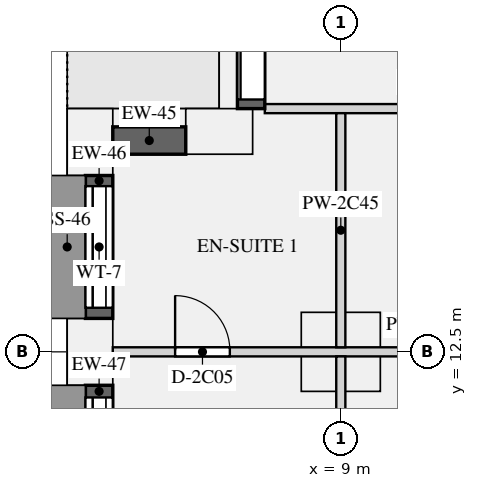
"""IFC4 building model, lengths in metres.
Left out: names, types, materials, properties, quantities, classifications, styles, units other than length and angle.
Written with IfcOpenShell. Run it as: python <this file> out.ifc"""

import sys

from ifc_helpers import new_model, si_unit, direction, frame, frame_2d, origin, origin_2d, place, context, subcontext, project, spatial, rectangle, extrude, element, fill, save


model = new_model("IFC4")
c1 = context("Model", 3, precision=1e-05, world=origin(), true_north=direction((0.0, 1.0)))
c2 = subcontext(c1, "Body", "Model", "MODEL_VIEW")
j1 = project(units=[si_unit("LENGTHUNIT", "METRE"), si_unit("PLANEANGLEUNIT", "RADIAN")], contexts=[c1])
p1 = place(None, origin())
s1 = spatial("IfcSite", under=j1, at=p1, CompositionType="ELEMENT")
p2 = place(p1, origin())
s2 = spatial("IfcBuilding", under=s1, at=p2, CompositionType="ELEMENT")
p3 = place(p2, frame((0.0, 0.0, 102.45)))
s3 = spatial("IfcBuildingStorey", under=s2, at=p3, CompositionType="ELEMENT", Elevation=102.45)
for number, where, z_axis, x_axis in (
    (1, (7.0, 16.125, 0.0), (0.0, 0.0, 1.0), (-1.0, 0.0, 0.0)),
    (2, (4.875, 15.95, 0.0), (0.0, 0.0, 1.0), (0.0, -1.0, 0.0)),
    (3, (4.875, 12.5, 0.0), (0.0, 0.0, 1.0), (0.0, -1.0, 0.0)),
):
    element("IfcColumn", number, at=place(p3, frame(where, z_axis=z_axis, x_axis=x_axis)), inside=s3, PredefinedType="USERDEFINED", context=c2, shape_type="SweptSolid", body=[
        extrude(rectangle(XDim=1.1, YDim=0.75, at=origin_2d()), origin(), (0.0, 0.0, 1.0), 3.15),
    ])
p4 = place(p3, frame((9.0, 12.5, 0.0), z_axis=(0.0, 0.0, 1.0), x_axis=(1.0, 0.0, 0.0)))
e4 = element("IfcColumn", 4, at=p4, inside=s3, PredefinedType="COLUMN", context=c2, shape_type="SweptSolid", body=[
    extrude(rectangle(XDim=1.3, YDim=1.3, at=origin_2d()), origin(), (0.0, 0.0, 1.0), 3.15),
])
p5 = place(p3, frame((7.525, 19.95, 0.0), z_axis=(0.0, 0.0, 1.0), x_axis=(0.0, -1.0, 0.0)))
e5 = element("IfcWall", 5, at=p5, inside=s3, PredefinedType="SOLIDWALL", context=c2, shape_type="SweptSolid", body=[
    extrude(rectangle(XDim=3.45, YDim=0.45, at=frame_2d((1.725, 0.0))), origin(), (0.0, 0.0, 1.0), 2.83),
])
p6 = place(p5, frame((0.15, 0.0, 0.0)))
e6 = element("IfcOpeningElement", 6, at=p6, cuts=e5, PredefinedType="OPENING", context=c2, shape_type="SweptSolid", body=[
    extrude(rectangle(XDim=3.15, YDim=2.3, at=frame_2d((1.575, 1.15))), frame((0.0, 0.235, 0.0), z_axis=(0.0, -1.0, 0.0), x_axis=(1.0, 0.0, 0.0)), (0.0, 0.0, 1.0), 0.47),
])
p7 = place(p3, frame((6.45, 15.975, 0.9), z_axis=(0.0, 0.0, 1.0), x_axis=(-1.0, 0.0, 0.0)))
e7 = element("IfcWall", 7, at=p7, inside=s3, PredefinedType="SOLIDWALL", context=c2, shape_type="SweptSolid", body=[
    extrude(rectangle(XDim=1.2, YDim=0.45, at=frame_2d((0.6, 0.0))), origin(), (0.0, 0.0, 1.0), 1.93),
])
p8 = place(p3, frame((5.025, 15.4, 0.9), z_axis=(0.0, 0.0, 1.0), x_axis=(0.0, -1.0, 0.0)))
e8 = element("IfcWall", 8, at=p8, inside=s3, PredefinedType="SOLIDWALL", context=c2, shape_type="SweptSolid", body=[
    extrude(rectangle(XDim=2.35, YDim=0.45, at=frame_2d((1.175, 0.0))), origin(), (0.0, 0.0, 1.0), 1.93),
])
p9 = place(p8, frame((0.175, 0.0, 0.15)))
e9 = element("IfcOpeningElement", 9, at=p9, cuts=e8, PredefinedType="OPENING", context=c2, shape_type="SweptSolid", body=[
    extrude(rectangle(XDim=2.0, YDim=1.5, at=frame_2d((1.0, 0.75))), frame((0.0, 0.235, 0.0), z_axis=(0.0, -1.0, 0.0), x_axis=(1.0, 0.0, 0.0)), (0.0, 0.0, 1.0), 0.47),
])
p10 = place(p3, frame((5.025, 11.95, 0.9), z_axis=(0.0, 0.0, 1.0), x_axis=(0.0, -1.0, 0.0)))
e10 = element("IfcWall", 10, at=p10, inside=s3, PredefinedType="SOLIDWALL", context=c2, shape_type="SweptSolid", body=[
    extrude(rectangle(XDim=2.9, YDim=0.45, at=frame_2d((1.45, 0.0))), origin(), (0.0, 0.0, 1.0), 1.93),
])
p11 = place(p10, frame((0.2, 0.0, 0.15)))
e11 = element("IfcOpeningElement", 11, at=p11, cuts=e10, PredefinedType="OPENING", context=c2, shape_type="SweptSolid", body=[
    extrude(rectangle(XDim=2.5, YDim=1.5, at=frame_2d((1.25, 0.75))), frame((0.0, 0.235, 0.0), z_axis=(0.0, -1.0, 0.0), x_axis=(1.0, 0.0, 0.0)), (0.0, 0.0, 1.0), 0.47),
])
p12 = place(p3, frame((5.25, 12.5, 0.0), z_axis=(0.0, 0.0, 1.0), x_axis=(1.0, 0.0, 0.0)))
e12 = element("IfcWall", 12, at=p12, inside=s3, PredefinedType="PARTITIONING", context=c2, shape_type="SweptSolid", body=[
    extrude(rectangle(XDim=8.325, YDim=0.15, at=frame_2d((4.163, 0.0))), origin(), (0.0, 0.0, 1.0), 2.83),
])
p13 = place(p12, frame((1.025, 0.0, 0.0)))
e13 = element("IfcOpeningElement", 13, at=p13, cuts=e12, PredefinedType="OPENING", context=c2, shape_type="SweptSolid", body=[
    extrude(rectangle(XDim=0.9, YDim=2.1, at=frame_2d((0.45, 1.05))), frame((0.0, 0.085, 0.0), z_axis=(0.0, -1.0, 0.0), x_axis=(1.0, 0.0, 0.0)), (0.0, 0.0, 1.0), 0.17),
])
p14 = place(p3, frame((7.75, 16.5, 0.0), z_axis=(0.0, 0.0, 1.0), x_axis=(1.0, 0.0, 0.0)))
e14 = element("IfcWall", 14, at=p14, inside=s3, PredefinedType="PARTITIONING", context=c2, shape_type="SweptSolid", body=[
    extrude(rectangle(XDim=5.675, YDim=0.15, at=frame_2d((2.837, 0.0))), origin(), (0.0, 0.0, 1.0), 2.83),
])
p15 = place(p3, frame((9.0, 5.25, 0.0), z_axis=(0.0, 0.0, 1.0), x_axis=(0.0, 1.0, 0.0)))
e15 = element("IfcWall", 15, at=p15, inside=s3, PredefinedType="PARTITIONING", context=c2, shape_type="SweptSolid", body=[
    extrude(rectangle(XDim=7.175, YDim=0.15, at=frame_2d((3.587, 0.0))), origin(), (0.0, 0.0, 1.0), 2.83),
])
p16 = place(p15, frame((4.475, 0.0, 0.0)))
e16 = element("IfcOpeningElement", 16, at=p16, cuts=e15, PredefinedType="OPENING", context=c2, shape_type="SweptSolid", body=[
    extrude(rectangle(XDim=0.9, YDim=2.1, at=frame_2d((0.45, 1.05))), frame((0.0, 0.085, 0.0), z_axis=(0.0, -1.0, 0.0), x_axis=(1.0, 0.0, 0.0)), (0.0, 0.0, 1.0), 0.17),
])
p17 = place(p3, frame((9.0, 12.575, 0.0), z_axis=(0.0, 0.0, 1.0), x_axis=(0.0, 1.0, 0.0)))
e17 = element("IfcWall", 17, at=p17, inside=s3, PredefinedType="PARTITIONING", context=c2, shape_type="SweptSolid", body=[
    extrude(rectangle(XDim=3.85, YDim=0.15, at=frame_2d((1.925, 0.0))), origin(), (0.0, 0.0, 1.0), 2.83),
])
p18 = place(p6, origin())
e18 = element("IfcDoor", 18, at=p18, inside=s3, OperationType="SLIDING_TO_LEFT", PredefinedType="DOOR", context=c2, shape_type="SweptSolid", body=[
    extrude(rectangle(XDim=3.15, YDim=2.3, at=frame_2d((1.575, 1.15))), frame((0.0, -0.07, 0.0), z_axis=(0.0, -1.0, 0.0), x_axis=(1.0, 0.0, 0.0)), (0.0, 0.0, 1.0), 0.05),
])
fill(e6, e18)
p19 = place(p9, origin())
e19 = element("IfcWindow", 19, at=p19, inside=s3, PartitioningType="SINGLE_PANEL", PredefinedType="WINDOW", context=c2, shape_type="SweptSolid", body=[
    extrude(rectangle(XDim=2.0, YDim=1.5, at=frame_2d((1.0, 0.75))), frame((0.0, -0.065, 0.0), z_axis=(0.0, -1.0, 0.0), x_axis=(1.0, 0.0, 0.0)), (0.0, 0.0, 1.0), 0.06),
])
fill(e9, e19)
p20 = place(p11, origin())
e20 = element("IfcWindow", 20, at=p20, inside=s3, PartitioningType="SINGLE_PANEL", PredefinedType="WINDOW", context=c2, shape_type="SweptSolid", body=[
    extrude(rectangle(XDim=2.5, YDim=1.5, at=frame_2d((1.25, 0.75))), frame((0.0, -0.065, 0.0), z_axis=(0.0, -1.0, 0.0), x_axis=(1.0, 0.0, 0.0)), (0.0, 0.0, 1.0), 0.06),
])
fill(e11, e20)
p21 = place(p13, origin())
e21 = element("IfcDoor", 21, at=p21, inside=s3, OperationType="SINGLE_SWING_LEFT", PredefinedType="DOOR", context=c2, shape_type="SweptSolid", body=[
    extrude(rectangle(XDim=0.9, YDim=2.1, at=frame_2d((0.45, 1.05))), frame((0.0, 0.025, 0.0), z_axis=(0.0, -1.0, 0.0), x_axis=(1.0, 0.0, 0.0)), (0.0, 0.0, 1.0), 0.05),
])
fill(e13, e21)
save(model, sys.argv[1])
